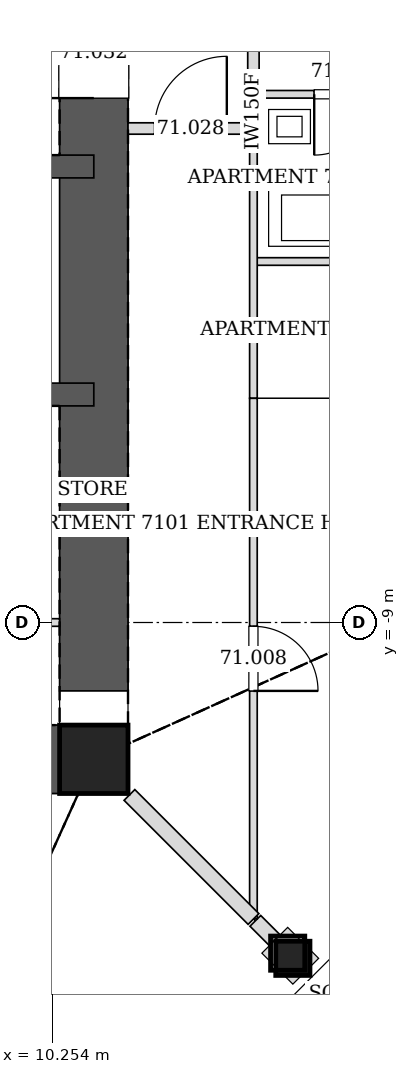
"""IFC4 building model, lengths in metres.
Left out: names, types, materials, properties, quantities, classifications, styles, units other than length and angle.
Written with IfcOpenShell. Run it as: python <this file> out.ifc"""

import sys

from ifc_helpers import new_model, si_unit, direction, frame, frame_2d, origin, origin_2d, place, context, subcontext, project, spatial, rectangle, hollow_rectangle, extrude, element, fill, save


model = new_model("IFC4")
c1 = context("Model", 3, precision=1e-05, world=origin(), true_north=direction((0.0, 1.0)))
c2 = subcontext(c1, "Body", "Model", "MODEL_VIEW")
j1 = project(units=[si_unit("LENGTHUNIT", "METRE"), si_unit("PLANEANGLEUNIT", "RADIAN")], contexts=[c1])
p1 = place(None, origin())
s1 = spatial("IfcSite", under=j1, at=p1, CompositionType="ELEMENT")
p2 = place(p1, origin())
s2 = spatial("IfcBuilding", under=s1, at=p2, CompositionType="ELEMENT")
p3 = place(p2, frame((0.0, 0.0, 291.2)))
s3 = spatial("IfcBuildingStorey", under=s2, at=p3, CompositionType="ELEMENT", Elevation=291.2)
p4 = place(p3, frame((13.419, -13.419, 0.0), z_axis=(-0.020024994503, 0.020024994503, 0.999598919162), x_axis=(-0.707106781187, -0.707106781187, 0.0)))
e1 = element("IfcColumn", 1, at=p4, inside=s3, PredefinedType="COLUMN", context=c2, shape_type="SweptSolid", body=[
    extrude(hollow_rectangle(XDim=0.45, YDim=0.45, WallThickness=0.02, at=origin_2d()), origin(), (0.0, 0.0, 1.0), 3.402),
])
p5 = place(p3, frame((10.8, -10.8, 0.0), z_axis=(0.0, 0.0, 1.0), x_axis=(1.0, 0.0, 0.0)))
e2 = element("IfcColumn", 2, at=p5, inside=s3, PredefinedType="COLUMN", context=c2, shape_type="SweptSolid", body=[
    extrude(hollow_rectangle(XDim=0.9, YDim=0.9, WallThickness=0.04, at=origin_2d()), origin(), (0.0, 0.0, 1.0), 3.4),
])
p6 = place(p3, frame((-10.8, -10.8, 0.0), z_axis=(0.0, 0.0, 1.0), x_axis=(1.0, 0.0, 0.0)))
e3 = element("IfcWall", 3, at=p6, inside=s3, PredefinedType="SOLIDWALL", context=c2, shape_type="SweptSolid", body=[
    extrude(rectangle(XDim=21.6, YDim=0.9, at=frame_2d((10.8, 0.0))), origin(), (0.0, 0.0, 1.0), 3.4),
])
p7 = place(p6, frame((10.05, 0.0, 0.0)))
e4 = element("IfcOpeningElement", 4, at=p7, cuts=e3, PredefinedType="OPENING", context=c2, shape_type="SweptSolid", body=[
    extrude(rectangle(XDim=1.5, YDim=2.1, at=frame_2d((0.75, 1.05))), frame((0.0, 0.46, 0.0), z_axis=(0.0, -1.0, 0.0), x_axis=(1.0, 0.0, 0.0)), (0.0, 0.0, 1.0), 0.92),
])
p8 = place(p6, frame((17.1, 0.0, 0.0)))
e5 = element("IfcOpeningElement", 5, at=p8, cuts=e3, PredefinedType="OPENING", context=c2, shape_type="SweptSolid", body=[
    extrude(rectangle(XDim=0.9, YDim=2.1, at=frame_2d((0.45, 1.05))), frame((0.0, 0.46, 0.0), z_axis=(0.0, -1.0, 0.0), x_axis=(1.0, 0.0, 0.0)), (0.0, 0.0, 1.0), 0.92),
])
p9 = place(p3, frame((10.8, -10.8, 0.0), z_axis=(0.0, 0.0, 1.0), x_axis=(0.0, 1.0, 0.0)))
e6 = element("IfcWall", 6, at=p9, inside=s3, PredefinedType="SOLIDWALL", context=c2, shape_type="SweptSolid", body=[
    extrude(rectangle(XDim=21.6, YDim=0.9, at=frame_2d((10.8, 0.0))), origin(), (0.0, 0.0, 1.0), 3.4),
])
p10 = place(p9, frame((11.7, 0.0, 0.0)))
e7 = element("IfcOpeningElement", 7, at=p10, cuts=e6, PredefinedType="OPENING", context=c2, shape_type="SweptSolid", body=[
    extrude(rectangle(XDim=1.2, YDim=2.1, at=frame_2d((0.6, 1.05))), frame((0.0, 0.46, 0.0), z_axis=(0.0, -1.0, 0.0), x_axis=(1.0, 0.0, 0.0)), (0.0, 0.0, 1.0), 0.92),
])
p11 = place(p9, frame((8.7, 0.0, 0.0)))
e8 = element("IfcOpeningElement", 8, at=p11, cuts=e6, PredefinedType="OPENING", context=c2, shape_type="SweptSolid", body=[
    extrude(rectangle(XDim=1.2, YDim=2.1, at=frame_2d((0.6, 1.05))), frame((0.0, 0.46, 0.0), z_axis=(0.0, -1.0, 0.0), x_axis=(1.0, 0.0, 0.0)), (0.0, 0.0, 1.0), 0.92),
])
p12 = place(p3, frame((-10.8, -3.0, 0.0), z_axis=(0.0, 0.0, 1.0), x_axis=(1.0, 0.0, 0.0)))
e9 = element("IfcWall", 9, at=p12, inside=s3, PredefinedType="SOLIDWALL", context=c2, shape_type="SweptSolid", body=[
    extrude(rectangle(XDim=21.6, YDim=0.3, at=frame_2d((10.8, 0.0))), origin(), (0.0, 0.0, 1.0), 3.4),
])
p13 = place(p12, frame((13.25, 0.0, 0.0)))
e10 = element("IfcOpeningElement", 10, at=p13, cuts=e9, PredefinedType="OPENING", context=c2, shape_type="SweptSolid", body=[
    extrude(rectangle(XDim=0.9, YDim=2.1, at=frame_2d((0.45, 1.05))), frame((0.0, 0.16, 0.0), z_axis=(0.0, -1.0, 0.0), x_axis=(1.0, 0.0, 0.0)), (0.0, 0.0, 1.0), 0.32),
])
p14 = place(p12, frame((1.65, 0.0, 0.0)))
e11 = element("IfcOpeningElement", 11, at=p14, cuts=e9, PredefinedType="OPENING", context=c2, shape_type="SweptSolid", body=[
    extrude(rectangle(XDim=0.9, YDim=2.1, at=frame_2d((0.45, 1.05))), frame((0.0, 0.16, 0.0), z_axis=(0.0, -1.0, 0.0), x_axis=(1.0, 0.0, 0.0)), (0.0, 0.0, 1.0), 0.32),
])
p15 = place(p12, frame((4.55, 0.0, 0.0)))
e12 = element("IfcOpeningElement", 12, at=p15, cuts=e9, PredefinedType="OPENING", context=c2, shape_type="SweptSolid", body=[
    extrude(rectangle(XDim=0.9, YDim=2.1, at=frame_2d((0.45, 1.05))), frame((0.0, 0.16, 0.0), z_axis=(0.0, -1.0, 0.0), x_axis=(1.0, 0.0, 0.0)), (0.0, 0.0, 1.0), 0.32),
])
p16 = place(p12, frame((7.45, 0.0, 0.0)))
e13 = element("IfcOpeningElement", 13, at=p16, cuts=e9, PredefinedType="OPENING", context=c2, shape_type="SweptSolid", body=[
    extrude(rectangle(XDim=0.9, YDim=2.1, at=frame_2d((0.45, 1.05))), frame((0.0, 0.16, 0.0), z_axis=(0.0, -1.0, 0.0), x_axis=(1.0, 0.0, 0.0)), (0.0, 0.0, 1.0), 0.32),
])
p17 = place(p12, frame((16.05, 0.0, 0.0)))
e14 = element("IfcOpeningElement", 14, at=p17, cuts=e9, PredefinedType="OPENING", context=c2, shape_type="SweptSolid", body=[
    extrude(rectangle(XDim=1.1, YDim=2.1, at=frame_2d((0.55, 1.05))), frame((0.0, 0.16, 0.0), z_axis=(0.0, -1.0, 0.0), x_axis=(1.0, 0.0, 0.0)), (0.0, 0.0, 1.0), 0.32),
])
p18 = place(p12, frame((18.95, 0.0, 0.0)))
e15 = element("IfcOpeningElement", 15, at=p18, cuts=e9, PredefinedType="OPENING", context=c2, shape_type="SweptSolid", body=[
    extrude(rectangle(XDim=1.1, YDim=2.1, at=frame_2d((0.55, 1.05))), frame((0.0, 0.16, 0.0), z_axis=(0.0, -1.0, 0.0), x_axis=(1.0, 0.0, 0.0)), (0.0, 0.0, 1.0), 0.32),
])
p19 = place(p3, frame((-10.8, -6.0, 0.0), z_axis=(0.0, 0.0, 1.0), x_axis=(1.0, 0.0, 0.0)))
e16 = element("IfcWall", 16, at=p19, inside=s3, PredefinedType="SOLIDWALL", context=c2, shape_type="SweptSolid", body=[
    extrude(rectangle(XDim=21.6, YDim=0.3, at=frame_2d((10.8, 0.0))), origin(), (0.0, 0.0, 1.0), 3.4),
])
p20 = place(p19, frame((10.25, 0.0, 0.0)))
e17 = element("IfcOpeningElement", 17, at=p20, cuts=e16, PredefinedType="OPENING", context=c2, shape_type="SweptSolid", body=[
    extrude(rectangle(XDim=1.1, YDim=2.1, at=frame_2d((0.55, 1.05))), frame((0.0, 0.16, 0.0), z_axis=(0.0, -1.0, 0.0), x_axis=(1.0, 0.0, 0.0)), (0.0, 0.0, 1.0), 0.32),
])
p21 = place(p3, frame((12.9, -2.5, 0.0), z_axis=(0.0, 0.0, 1.0), x_axis=(0.0, 1.0, 0.0)))
e18 = element("IfcWall", 18, at=p21, inside=s3, PredefinedType="PARTITIONING", context=c2, shape_type="SweptSolid", body=[
    extrude(rectangle(XDim=0.451, YDim=0.15, at=frame_2d((0.226, 0.0))), origin(), (0.0, 0.0, 1.0), 3.2),
])
p22 = place(p3, frame((12.9, -2.051, 0.0), z_axis=(0.0, 0.0, 1.0), x_axis=(0.0, 1.0, 0.0)))
e19 = element("IfcWall", 19, at=p22, inside=s3, PredefinedType="PARTITIONING", context=c2, shape_type="SweptSolid", body=[
    extrude(rectangle(XDim=9.602, YDim=0.15, at=frame_2d((4.801, 0.0))), origin(), (0.0, 0.0, 1.0), 2.349),
])
p23 = place(p3, frame((11.25, -2.5, 0.0), z_axis=(0.0, 0.0, 1.0), x_axis=(1.0, 0.0, 0.0)))
e20 = element("IfcWall", 20, at=p23, inside=s3, PredefinedType="PARTITIONING", context=c2, shape_type="SweptSolid", body=[
    extrude(rectangle(XDim=1.65, YDim=0.15, at=frame_2d((0.825, 0.0))), origin(), (0.0, 0.0, 1.0), 3.2),
])
p24 = place(p23, frame((0.35, 0.0, 0.0)))
e21 = element("IfcOpeningElement", 21, at=p24, cuts=e20, PredefinedType="OPENING", context=c2, shape_type="SweptSolid", body=[
    extrude(rectangle(XDim=0.95, YDim=2.1, at=frame_2d((0.475, 1.05))), frame((0.0, 0.085, 0.0), z_axis=(0.0, -1.0, 0.0), x_axis=(1.0, 0.0, 0.0)), (0.0, 0.0, 1.0), 0.17),
])
p25 = place(p3, frame((15.3, -4.25, 0.0), z_axis=(0.0, 0.0, 1.0), x_axis=(-1.0, 0.0, 0.0)))
e22 = element("IfcWall", 22, at=p25, inside=s3, PredefinedType="PARTITIONING", context=c2, shape_type="SweptSolid", body=[
    extrude(rectangle(XDim=2.4, YDim=0.1, at=frame_2d((1.2, 0.0))), origin(), (0.0, 0.0, 1.0), 2.73),
])
p26 = place(p3, frame((12.9, -6.05, 0.0), z_axis=(0.0, 0.0, 1.0), x_axis=(0.0, 1.0, 0.0)))
e23 = element("IfcWall", 23, at=p26, inside=s3, PredefinedType="PARTITIONING", context=c2, shape_type="SweptSolid", body=[
    extrude(rectangle(XDim=3.551, YDim=0.1, at=frame_2d((1.775, 0.0))), origin(), (0.0, 0.0, 1.0), 3.2),
])
p27 = place(p3, frame((15.3, -2.05, 0.0), z_axis=(0.0, 0.0, 1.0), x_axis=(-1.0, 0.0, 0.0)))
e24 = element("IfcWall", 24, at=p27, inside=s3, PredefinedType="PARTITIONING", context=c2, shape_type="SweptSolid", body=[
    extrude(rectangle(XDim=2.4, YDim=0.1, at=frame_2d((1.2, 0.0))), origin(), (0.0, 0.0, 1.0), 2.73),
])
p28 = place(p27, frame((0.8, 0.0, 0.0)))
e25 = element("IfcOpeningElement", 25, at=p28, cuts=e24, PredefinedType="OPENING", context=c2, shape_type="SweptSolid", body=[
    extrude(rectangle(XDim=0.8, YDim=2.1, at=frame_2d((0.4, 1.05))), frame((0.0, 0.06, 0.0), z_axis=(0.0, -1.0, 0.0), x_axis=(1.0, 0.0, 0.0)), (0.0, 0.0, 1.0), 0.12),
])
p29 = place(p3, frame((12.926, -12.926, 0.0), z_axis=(0.0, 0.0, 1.0), x_axis=(0.707106781187, -0.707106781187, 0.0)))
e26 = element("IfcWall", 26, at=p29, inside=s3, PredefinedType="PARTITIONING", context=c2, shape_type="SweptSolid", body=[
    extrude(rectangle(XDim=0.357, YDim=0.2, at=frame_2d((0.179, 0.0))), origin(), (0.0, 0.0, 1.0), 2.591),
])
p30 = place(p3, frame((12.9, -6.05, 0.0), z_axis=(0.0, 0.0, 1.0), x_axis=(0.0, -1.0, 0.0)))
e27 = element("IfcWall", 27, at=p30, inside=s3, PredefinedType="PARTITIONING", context=c2, shape_type="SweptSolid", body=[
    extrude(rectangle(XDim=6.85, YDim=0.1, at=frame_2d((3.425, 0.0))), origin(), (0.0, 0.0, 1.0), 2.497),
])
p31 = place(p30, frame((3.0, 0.0, 0.0)))
e28 = element("IfcOpeningElement", 28, at=p31, cuts=e27, PredefinedType="OPENING", context=c2, shape_type="SweptSolid", body=[
    extrude(rectangle(XDim=0.85, YDim=2.1, at=frame_2d((0.425, 1.05))), frame((0.0, 0.06, 0.0), z_axis=(0.0, -1.0, 0.0), x_axis=(1.0, 0.0, 0.0)), (0.0, 0.0, 1.0), 0.12),
])
p32 = place(p3, frame((12.901, -12.901, 0.0), z_axis=(0.0, 0.0, 1.0), x_axis=(-0.707106781187, 0.707106781187, 0.0)))
e29 = element("IfcWall", 29, at=p32, inside=s3, PredefinedType="PARTITIONING", context=c2, shape_type="SweptSolid", body=[
    extrude(rectangle(XDim=2.308, YDim=0.2, at=frame_2d((1.154, 0.0))), origin(), (0.0, 0.0, 1.0), 2.591),
])
p33 = place(p3, frame((6.1, -9.0, 0.0), z_axis=(0.0, 0.0, 1.0), x_axis=(1.0, 0.0, 0.0)))
e30 = element("IfcWall", 30, at=p33, inside=s3, PredefinedType="PARTITIONING", context=c2, shape_type="SweptSolid", body=[
    extrude(rectangle(XDim=4.25, YDim=0.1, at=frame_2d((2.125, 0.0))), origin(), (0.0, 0.0, 1.0), 3.2),
])
p34 = place(p33, frame((0.613, 0.0, 0.0)))
e31 = element("IfcOpeningElement", 31, at=p34, cuts=e30, PredefinedType="OPENING", context=c2, shape_type="SweptSolid", body=[
    extrude(rectangle(XDim=0.9, YDim=2.1, at=frame_2d((0.45, 1.05))), frame((0.0, 0.06, 0.0), z_axis=(0.0, -1.0, 0.0), x_axis=(1.0, 0.0, 0.0)), (0.0, 0.0, 1.0), 0.12),
])
p35 = place(p33, frame((2.738, 0.0, 0.0)))
e32 = element("IfcOpeningElement", 32, at=p35, cuts=e30, PredefinedType="OPENING", context=c2, shape_type="SweptSolid", body=[
    extrude(rectangle(XDim=0.9, YDim=2.1, at=frame_2d((0.45, 1.05))), frame((0.0, 0.06, 0.0), z_axis=(0.0, -1.0, 0.0), x_axis=(1.0, 0.0, 0.0)), (0.0, 0.0, 1.0), 0.12),
])
p36 = place(p28, origin())
e33 = element("IfcDoor", 33, at=p36, inside=s3, OperationType="SINGLE_SWING_RIGHT", PredefinedType="DOOR", context=c2, shape_type="SweptSolid", body=[
    extrude(rectangle(XDim=0.8, YDim=2.1, at=frame_2d((0.4, 1.05))), frame((0.0, 0.025, 0.0), z_axis=(0.0, -1.0, 0.0), x_axis=(1.0, 0.0, 0.0)), (0.0, 0.0, 1.0), 0.05),
])
fill(e25, e33)
p37 = place(p31, origin())
e34 = element("IfcDoor", 34, at=p37, inside=s3, OperationType="SINGLE_SWING_RIGHT", PredefinedType="DOOR", context=c2, shape_type="SweptSolid", body=[
    extrude(rectangle(XDim=0.85, YDim=2.1, at=frame_2d((0.425, 1.05))), frame((0.0, 0.025, 0.0), z_axis=(0.0, -1.0, 0.0), x_axis=(1.0, 0.0, 0.0)), (0.0, 0.0, 1.0), 0.05),
])
fill(e28, e34)
p38 = place(p24, origin())
e35 = element("IfcDoor", 35, at=p38, inside=s3, OperationType="SINGLE_SWING_RIGHT", PredefinedType="DOOR", context=c2, shape_type="SweptSolid", body=[
    extrude(rectangle(XDim=0.95, YDim=2.1, at=frame_2d((0.475, 1.05))), frame((0.0, 0.025, 0.0), z_axis=(0.0, -1.0, 0.0), x_axis=(1.0, 0.0, 0.0)), (0.0, 0.0, 1.0), 0.05),
])
fill(e21, e35)
p39 = place(p11, origin())
e36 = element("IfcDoor", 36, at=p39, inside=s3, OperationType="SINGLE_SWING_LEFT", PredefinedType="DOOR", context=c2, shape_type="SweptSolid", body=[
    extrude(rectangle(XDim=1.2, YDim=2.1, at=frame_2d((0.6, 1.05))), frame((0.0, 0.025, 0.0), z_axis=(0.0, -1.0, 0.0), x_axis=(1.0, 0.0, 0.0)), (0.0, 0.0, 1.0), 0.05),
])
fill(e8, e36)
save(model, sys.argv[1])
